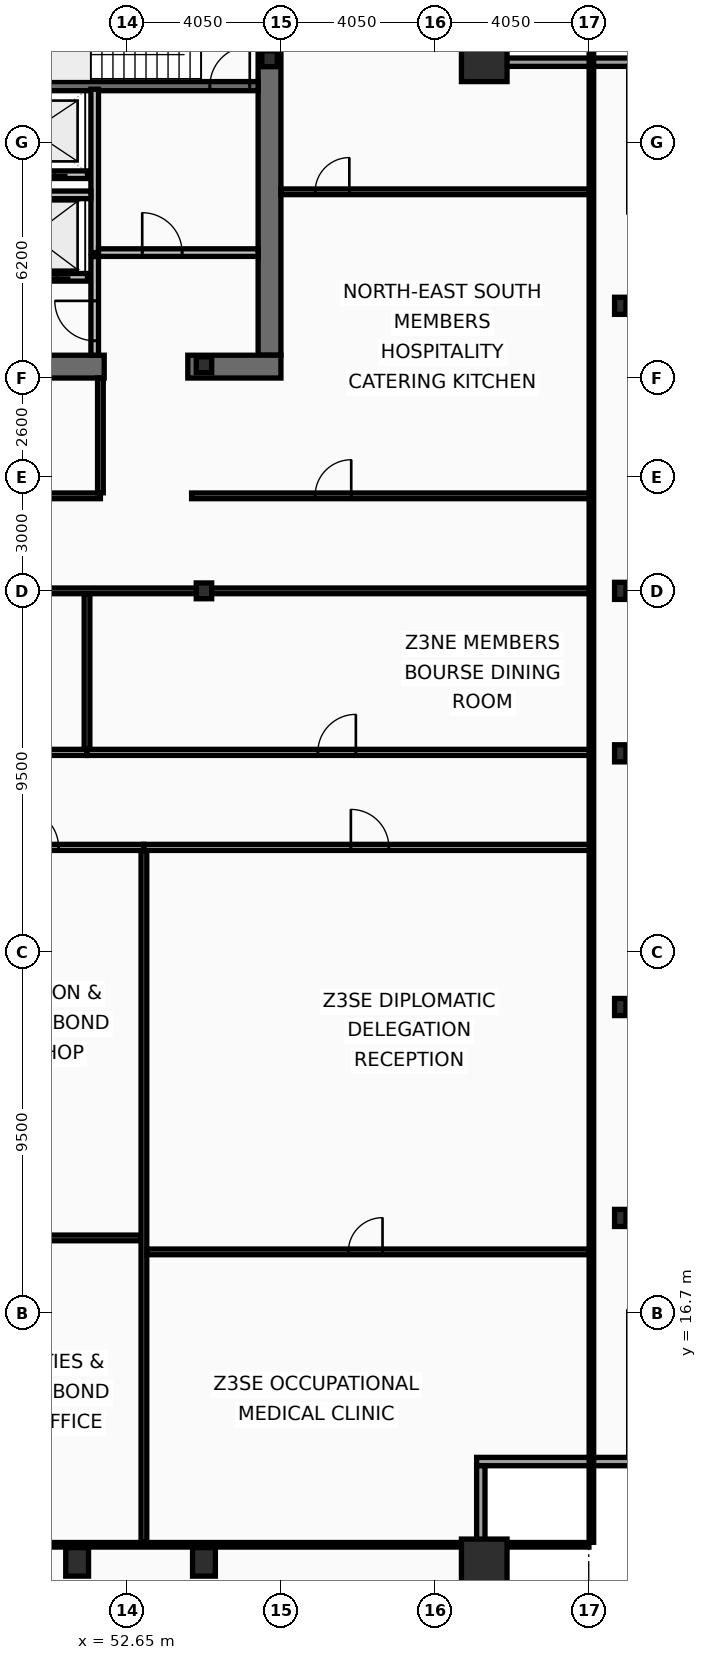
"""IFC4 building model, lengths in metres.
Left out: names, types, materials, properties, quantities, classifications, styles, units other than length and angle.
Written with IfcOpenShell. Run it as: python <this file> out.ifc"""

import sys

from ifc_helpers import new_model, si_unit, direction, frame, frame_2d, origin, origin_2d, place, context, subcontext, project, spatial, rectangle, hollow_rectangle, i_section, extrude, element, fill, save


model = new_model("IFC4")
c1 = context("Model", 3, precision=1e-05, world=origin(), true_north=direction((0.0, 1.0)))
c2 = subcontext(c1, "Body", "Model", "MODEL_VIEW")
j1 = project(units=[si_unit("LENGTHUNIT", "METRE"), si_unit("PLANEANGLEUNIT", "RADIAN")], contexts=[c1])
p1 = place(None, origin())
s1 = spatial("IfcSite", under=j1, at=p1, CompositionType="ELEMENT")
p2 = place(p1, origin())
s2 = spatial("IfcBuilding", under=s1, at=p2, CompositionType="ELEMENT")
p3 = place(p2, frame((0.0, 0.0, 213.8)))
s3 = spatial("IfcBuildingStorey", under=s2, at=p3, CompositionType="ELEMENT", Elevation=213.8)
p4 = place(p3, frame((56.4, 53.1, 0.0), z_axis=(0.0, 0.0, 1.0), x_axis=(0.0, -1.0, 0.0)))
e1 = element("IfcWall", 1, at=p4, inside=s3, PredefinedType="SHEAR", context=c2, shape_type="SweptSolid", body=[
    extrude(rectangle(XDim=11.2, YDim=0.6, at=frame_2d((5.6, 0.0))), origin(), (0.0, 0.0, 1.0), 3.44),
])
p5 = place(p3, frame((52.05, 41.6, 0.0), z_axis=(0.0, 0.0, 1.0), x_axis=(-1.0, 0.0, 0.0)))
e2 = element("IfcWall", 2, at=p5, inside=s3, PredefinedType="SHEAR", context=c2, shape_type="SweptSolid", body=[
    extrude(rectangle(XDim=11.3, YDim=0.6, at=frame_2d((5.65, 0.0))), origin(), (0.0, 0.0, 1.0), 3.44),
])
p6 = place(p3, frame((56.7, 41.6, 0.0), z_axis=(0.0, 0.0, 1.0), x_axis=(-1.0, 0.0, 0.0)))
e3 = element("IfcWall", 3, at=p6, inside=s3, PredefinedType="SHEAR", context=c2, shape_type="SweptSolid", body=[
    extrude(rectangle(XDim=2.45, YDim=0.6, at=frame_2d((1.225, 0.0))), origin(), (0.0, 0.0, 1.0), 3.44),
])
p7 = place(p3, frame((48.63, 48.98, 0.0), z_axis=(0.0, 0.0, 1.0), x_axis=(1.0, 0.0, 0.0)))
e4 = element("IfcWall", 4, at=p7, inside=s3, PredefinedType="SHEAR", context=c2, shape_type="SweptSolid", body=[
    extrude(rectangle(XDim=7.47, YDim=0.24, at=frame_2d((3.735, 0.0))), origin(), (0.0, 0.0, 1.0), 3.44),
])
p8 = place(p7, frame((6.2, 0.0, 0.0)))
e5 = element("IfcOpeningElement", 5, at=p8, cuts=e4, PredefinedType="OPENING", context=c2, shape_type="SweptSolid", body=[
    extrude(rectangle(XDim=1.05, YDim=2.15, at=frame_2d((0.525, 1.075))), frame((0.0, 0.13, 0.0), z_axis=(0.0, -1.0, 0.0), x_axis=(1.0, 0.0, 0.0)), (0.0, 0.0, 1.0), 0.26),
])
for number, where, z_axis, x_axis in (
    (6, (62.05, 10.15, 0.0), (0.0, 0.0, 1.0), (1.0, 0.0, 0.0)),
    (7, (62.05, 49.7, 0.0), (0.0, 0.0, 1.0), (1.0, 0.0, 0.0)),
):
    element("IfcColumn", number, at=place(p3, frame(where, z_axis=z_axis, x_axis=x_axis)), inside=s3, PredefinedType="COLUMN", context=c2, shape_type="SweptSolid", body=[
        extrude(hollow_rectangle(XDim=1.2, YDim=1.2, WallThickness=0.06, at=origin_2d()), origin(), (0.0, 0.0, 1.0), 3.6),
    ])
for number, where, z_axis, x_axis in (
    (8, (51.337, 10.15, 0.0), (0.0, 0.0, 1.0), (1.0, 0.0, 0.0)),
    (9, (54.675, 10.15, 0.0), (0.0, 0.0, 1.0), (1.0, 0.0, 0.0)),
):
    element("IfcColumn", number, at=place(p3, frame(where, z_axis=z_axis, x_axis=x_axis)), inside=s3, PredefinedType="COLUMN", context=c2, shape_type="SweptSolid", body=[
        extrude(hollow_rectangle(XDim=0.6, YDim=0.75, WallThickness=0.045, at=origin_2d()), origin(), (0.0, 0.0, 1.0), 3.6),
    ])
for number, where, z_axis, x_axis in (
    (10, (65.63, 19.2, 0.0), (0.0, 0.0, 1.0), (1.0, 0.0, 0.0)),
    (11, (65.63, 24.75, 0.0), (0.0, 0.0, 1.0), (1.0, 0.0, 0.0)),
    (12, (65.63, 31.425, 0.0), (0.0, 0.0, 1.0), (1.0, 0.0, 0.0)),
    (13, (65.63, 35.7, 0.0), (0.0, 0.0, 1.0), (1.0, 0.0, 0.0)),
    (14, (65.63, 43.2, 0.0), (0.0, 0.0, 1.0), (1.0, 0.0, 0.0)),
):
    element("IfcColumn", number, at=place(p3, frame(where, z_axis=z_axis, x_axis=x_axis)), inside=s3, PredefinedType="COLUMN", context=c2, shape_type="SweptSolid", body=[
        extrude(i_section(OverallWidth=0.3, OverallDepth=0.45, WebThickness=0.014, FlangeThickness=0.026, at=origin_2d()), origin(), (0.0, 0.0, 1.0), 3.6),
    ])
for number, where, z_axis, x_axis in (
    (15, (56.4, 49.7, 0.0), (0.0, 0.0, 1.0), (1.0, 0.0, 0.0)),
    (16, (54.675, 35.7, 0.0), (0.0, 0.0, 1.0), (1.0, 0.0, 0.0)),
    (17, (54.675, 41.65, 0.0), (0.0, 0.0, 1.0), (1.0, 0.0, 0.0)),
):
    element("IfcColumn", number, at=place(p3, frame(where, z_axis=z_axis, x_axis=x_axis)), inside=s3, PredefinedType="COLUMN", context=c2, shape_type="SweptSolid", body=[
        extrude(i_section(OverallWidth=0.406, OverallDepth=0.416, WebThickness=0.03, FlangeThickness=0.048, at=origin_2d()), origin(), (0.0, 0.0, 1.0), 3.6),
    ])
p9 = place(p3, frame((61.96, 53.63, 0.0), z_axis=(0.0, 0.0, 1.0), x_axis=(0.0, -1.0, 0.0)))
e18 = element("IfcWall", 18, at=p9, inside=s3, PredefinedType="SOLIDWALL", context=c2, shape_type="SweptSolid", body=[
    extrude(rectangle(XDim=3.91, YDim=0.22, at=frame_2d((1.955, 0.0))), origin(), (0.0, 0.0, 1.0), 2.83),
])
for number, where, z_axis, x_axis in (
    (19, (61.85, 49.61, 0.0), (0.0, 0.0, 1.0), (1.0, 0.0, 0.0)),
    (20, (66.07, 12.79, 0.0), (0.0, 0.0, 1.0), (-1.0, 0.0, 0.0)),
):
    element("IfcWall", number, at=place(p3, frame(where, z_axis=z_axis, x_axis=x_axis)), inside=s3, PredefinedType="SOLIDWALL", context=c2, shape_type="SweptSolid", body=[
        extrude(rectangle(XDim=4.22, YDim=0.22, at=frame_2d((2.11, 0.0))), origin(), (0.0, 0.0, 1.0), 2.83),
    ])
p10 = place(p3, frame((61.96, 12.68, 0.0), z_axis=(0.0, 0.0, 1.0), x_axis=(0.0, -1.0, 0.0)))
e21 = element("IfcWall", 21, at=p10, inside=s3, PredefinedType="SOLIDWALL", context=c2, shape_type="SweptSolid", body=[
    extrude(rectangle(XDim=3.91, YDim=0.22, at=frame_2d((1.955, 0.0))), origin(), (0.0, 0.0, 1.0), 2.83),
])
p11 = place(p3, frame((51.61, 43.95, 0.0), z_axis=(0.0, 0.0, 1.0), x_axis=(-1.0, 0.0, 0.0)))
e22 = element("IfcWall", 22, at=p11, inside=s3, PredefinedType="PARTITIONING", context=c2, shape_type="SweptSolid", body=[
    extrude(rectangle(XDim=2.92, YDim=0.2, at=frame_2d((1.46, 0.0))), origin(), (0.0, 0.0, 1.0), 3.44),
])
p12 = place(p11, frame((0.81, 0.0, 0.0)))
e23 = element("IfcOpeningElement", 23, at=p12, cuts=e22, PredefinedType="OPENING", context=c2, shape_type="SweptSolid", body=[
    extrude(rectangle(XDim=1.3, YDim=2.18, at=frame_2d((0.65, 1.09))), frame((0.0, 0.11, 0.0), z_axis=(0.0, -1.0, 0.0), x_axis=(1.0, 0.0, 0.0)), (0.0, 0.0, 1.0), 0.22),
])
p13 = place(p3, frame((51.61, 46.65, 0.0), z_axis=(0.0, 0.0, 1.0), x_axis=(-1.0, 0.0, 0.0)))
e24 = element("IfcWall", 24, at=p13, inside=s3, PredefinedType="PARTITIONING", context=c2, shape_type="SweptSolid", body=[
    extrude(rectangle(XDim=2.92, YDim=0.2, at=frame_2d((1.46, 0.0))), origin(), (0.0, 0.0, 1.0), 3.44),
])
p14 = place(p13, frame((0.86, 0.0, 0.0)))
e25 = element("IfcOpeningElement", 25, at=p14, cuts=e24, PredefinedType="OPENING", context=c2, shape_type="SweptSolid", body=[
    extrude(rectangle(XDim=1.2, YDim=2.18, at=frame_2d((0.6, 1.09))), frame((0.0, 0.11, 0.0), z_axis=(0.0, -1.0, 0.0), x_axis=(1.0, 0.0, 0.0)), (0.0, 0.0, 1.0), 0.22),
])
p15 = place(p3, frame((51.8, 44.6, 0.0), z_axis=(0.0, 0.0, 1.0), x_axis=(0.0, 1.0, 0.0)))
e26 = element("IfcWall", 26, at=p15, inside=s3, PredefinedType="PARTITIONING", context=c2, shape_type="SweptSolid", body=[
    extrude(rectangle(XDim=4.3, YDim=0.2, at=frame_2d((2.15, 0.0))), origin(), (0.0, 0.0, 1.0), 3.44),
])
p16 = place(p3, frame((51.9, 44.6, 0.0), z_axis=(0.0, 0.0, 1.0), x_axis=(1.0, 0.0, 0.0)))
e27 = element("IfcWall", 27, at=p16, inside=s3, PredefinedType="PARTITIONING", context=c2, shape_type="SweptSolid", body=[
    extrude(rectangle(XDim=4.2, YDim=0.2, at=frame_2d((2.1, 0.0))), origin(), (0.0, 0.0, 1.0), 3.44),
])
p17 = place(p16, frame((1.15, 0.0, 0.0)))
e28 = element("IfcOpeningElement", 28, at=p17, cuts=e27, PredefinedType="OPENING", context=c2, shape_type="SweptSolid", body=[
    extrude(rectangle(XDim=1.05, YDim=2.15, at=frame_2d((0.525, 1.075))), frame((0.0, 0.11, 0.0), z_axis=(0.0, -1.0, 0.0), x_axis=(1.0, 0.0, 0.0)), (0.0, 0.0, 1.0), 0.22),
])
p18 = place(p3, frame((48.63, 46.12, 0.0), z_axis=(0.0, 0.0, 1.0), x_axis=(1.0, 0.0, 0.0)))
e29 = element("IfcWall", 29, at=p18, inside=s3, PredefinedType="PARTITIONING", context=c2, shape_type="SweptSolid", body=[
    extrude(rectangle(XDim=3.07, YDim=0.2, at=frame_2d((1.535, 0.0))), origin(), (0.0, 0.0, 1.0), 3.44),
])
p19 = place(p3, frame((51.8, 41.9, 0.0), z_axis=(0.0, 0.0, 1.0), x_axis=(0.0, 1.0, 0.0)))
e30 = element("IfcWall", 30, at=p19, inside=s3, PredefinedType="PARTITIONING", context=c2, shape_type="SweptSolid", body=[
    extrude(rectangle(XDim=2.595, YDim=0.2, at=frame_2d((1.298, 0.0))), origin(), (0.0, 0.0, 1.0), 3.44),
])
p20 = place(p19, frame((0.38, 0.0, 0.0)))
e31 = element("IfcOpeningElement", 31, at=p20, cuts=e30, PredefinedType="OPENING", context=c2, shape_type="SweptSolid", body=[
    extrude(rectangle(XDim=1.05, YDim=2.15, at=frame_2d((0.525, 1.075))), frame((0.0, 0.11, 0.0), z_axis=(0.0, -1.0, 0.0), x_axis=(1.0, 0.0, 0.0)), (0.0, 0.0, 1.0), 0.22),
])
p21 = place(p3, frame((47.05, 38.2, 0.0), z_axis=(0.0, 0.0, 1.0), x_axis=(1.0, 0.0, 0.0)))
e32 = element("IfcWall", 32, at=p21, inside=s3, PredefinedType="PARTITIONING", context=c2, shape_type="SweptSolid", body=[
    extrude(rectangle(XDim=4.9, YDim=0.15, at=frame_2d((2.45, 0.0))), origin(), (0.0, 0.0, 1.0), 2.73),
])
p22 = place(p21, frame((1.1, 0.0, 0.0)))
e33 = element("IfcOpeningElement", 33, at=p22, cuts=e32, PredefinedType="OPENING", context=c2, shape_type="SweptSolid", body=[
    extrude(rectangle(XDim=1.0, YDim=2.05, at=frame_2d((0.5, 1.025))), frame((0.0, 0.085, 0.0), z_axis=(0.0, -1.0, 0.0), x_axis=(1.0, 0.0, 0.0)), (0.0, 0.0, 1.0), 0.17),
])
p23 = place(p3, frame((51.95, 38.28, 0.0), z_axis=(0.0, 0.0, 1.0), x_axis=(0.0, 1.0, 0.0)))
e34 = element("IfcWall", 34, at=p23, inside=s3, PredefinedType="PARTITIONING", context=c2, shape_type="SweptSolid", body=[
    extrude(rectangle(XDim=3.02, YDim=0.15, at=frame_2d((1.51, 0.0))), origin(), (0.0, 0.0, 1.0), 3.44),
])
p24 = place(p3, frame((54.35, 38.2, 0.0), z_axis=(0.0, 0.0, 1.0), x_axis=(1.0, 0.0, 0.0)))
e35 = element("IfcWall", 35, at=p24, inside=s3, PredefinedType="PARTITIONING", context=c2, shape_type="SweptSolid", body=[
    extrude(rectangle(XDim=10.52, YDim=0.15, at=frame_2d((5.26, 0.0))), origin(), (0.0, 0.0, 1.0), 2.73),
])
p25 = place(p24, frame((3.25, 0.0, 0.0)))
e36 = element("IfcOpeningElement", 36, at=p25, cuts=e35, PredefinedType="OPENING", context=c2, shape_type="SweptSolid", body=[
    extrude(rectangle(XDim=0.95, YDim=2.05, at=frame_2d((0.475, 1.025))), frame((0.0, 0.085, 0.0), z_axis=(0.0, -1.0, 0.0), x_axis=(1.0, 0.0, 0.0)), (0.0, 0.0, 1.0), 0.17),
])
p26 = place(p3, frame((56.7, 46.2, 0.0), z_axis=(0.0, 0.0, 1.0), x_axis=(1.0, 0.0, 0.0)))
e37 = element("IfcWall", 37, at=p26, inside=s3, PredefinedType="PARTITIONING", context=c2, shape_type="SweptSolid", body=[
    extrude(rectangle(XDim=8.105, YDim=0.15, at=frame_2d((4.052, 0.0))), origin(), (0.0, 0.0, 1.0), 2.83),
])
p27 = place(p26, frame((0.9, 0.0, 0.0)))
e38 = element("IfcOpeningElement", 38, at=p27, cuts=e37, PredefinedType="OPENING", context=c2, shape_type="SweptSolid", body=[
    extrude(rectangle(XDim=0.9, YDim=2.05, at=frame_2d((0.45, 1.025))), frame((0.0, 0.085, 0.0), z_axis=(0.0, -1.0, 0.0), x_axis=(1.0, 0.0, 0.0)), (0.0, 0.0, 1.0), 0.17),
])
p28 = place(p3, frame((39.88, 35.7, 0.0), z_axis=(0.0, 0.0, 1.0), x_axis=(1.0, 0.0, 0.0)))
e39 = element("IfcWall", 39, at=p28, inside=s3, PredefinedType="PARTITIONING", context=c2, shape_type="SweptSolid", body=[
    extrude(rectangle(XDim=24.925, YDim=0.15, at=frame_2d((12.462, 0.0))), origin(), (0.0, 0.0, 1.0), 2.73),
])
p29 = place(p3, frame((46.637, 28.95, 0.0), z_axis=(0.0, 0.0, 1.0), x_axis=(1.0, 0.0, 0.0)))
e40 = element("IfcWall", 40, at=p29, inside=s3, PredefinedType="PARTITIONING", context=c2, shape_type="SweptSolid", body=[
    extrude(rectangle(XDim=6.458, YDim=0.16, at=frame_2d((3.229, 0.0))), origin(), (0.0, 0.0, 1.0), 2.73),
])
p30 = place(p29, frame((3.212, 0.0, 0.0)))
e41 = element("IfcOpeningElement", 41, at=p30, cuts=e40, PredefinedType="OPENING", context=c2, shape_type="SweptSolid", body=[
    extrude(rectangle(XDim=1.0, YDim=2.05, at=frame_2d((0.5, 1.025))), frame((0.0, 0.09, 0.0), z_axis=(0.0, -1.0, 0.0), x_axis=(1.0, 0.0, 0.0)), (0.0, 0.0, 1.0), 0.18),
])
p31 = place(p3, frame((46.717, 18.674, 0.0), z_axis=(0.0, 0.0, 1.0), x_axis=(1.0, 0.0, 0.0)))
e42 = element("IfcWall", 42, at=p31, inside=s3, PredefinedType="PARTITIONING", context=c2, shape_type="SweptSolid", body=[
    extrude(rectangle(XDim=6.297, YDim=0.15, at=frame_2d((3.149, 0.0))), origin(), (0.0, 0.0, 1.0), 2.73),
])
p32 = place(p31, frame((2.906, 0.0, 0.0)))
e43 = element("IfcOpeningElement", 43, at=p32, cuts=e42, PredefinedType="OPENING", context=c2, shape_type="SweptSolid", body=[
    extrude(rectangle(XDim=0.9, YDim=2.05, at=frame_2d((0.45, 1.025))), frame((0.0, 0.085, 0.0), z_axis=(0.0, -1.0, 0.0), x_axis=(1.0, 0.0, 0.0)), (0.0, 0.0, 1.0), 0.17),
])
p33 = place(p3, frame((53.095, 28.95, 0.0), z_axis=(0.0, 0.0, 1.0), x_axis=(1.0, 0.0, 0.0)))
e44 = element("IfcWall", 44, at=p33, inside=s3, PredefinedType="PARTITIONING", context=c2, shape_type="SweptSolid", body=[
    extrude(rectangle(XDim=11.775, YDim=0.16, at=frame_2d((5.888, 0.0))), origin(), (0.0, 0.0, 1.0), 2.73),
])
p34 = place(p33, frame((5.446, 0.0, 0.0)))
e45 = element("IfcOpeningElement", 45, at=p34, cuts=e44, PredefinedType="OPENING", context=c2, shape_type="SweptSolid", body=[
    extrude(rectangle(XDim=1.0, YDim=2.05, at=frame_2d((0.5, 1.025))), frame((0.0, 0.09, 0.0), z_axis=(0.0, -1.0, 0.0), x_axis=(1.0, 0.0, 0.0)), (0.0, 0.0, 1.0), 0.18),
])
p35 = place(p3, frame((53.095, 10.665, 0.0), z_axis=(0.0, 0.0, 1.0), x_axis=(0.0, 1.0, 0.0)))
e46 = element("IfcWall", 46, at=p35, inside=s3, PredefinedType="PARTITIONING", context=c2, shape_type="SweptSolid", body=[
    extrude(rectangle(XDim=18.2, YDim=0.15, at=frame_2d((9.1, 0.0))), origin(), (0.0, 0.0, 1.0), 2.98),
])
p36 = place(p3, frame((53.175, 18.307, 0.0), z_axis=(0.0, 0.0, 1.0), x_axis=(1.0, 0.0, 0.0)))
e47 = element("IfcWall", 47, at=p36, inside=s3, PredefinedType="PARTITIONING", context=c2, shape_type="SweptSolid", body=[
    extrude(rectangle(XDim=11.63, YDim=0.15, at=frame_2d((5.815, 0.0))), origin(), (0.0, 0.0, 1.0), 2.73),
])
p37 = place(p36, frame((5.299, 0.0, 0.0)))
e48 = element("IfcOpeningElement", 48, at=p37, cuts=e47, PredefinedType="OPENING", context=c2, shape_type="SweptSolid", body=[
    extrude(rectangle(XDim=0.9, YDim=2.05, at=frame_2d((0.45, 1.025))), frame((0.0, 0.085, 0.0), z_axis=(0.0, -1.0, 0.0), x_axis=(1.0, 0.0, 0.0)), (0.0, 0.0, 1.0), 0.17),
])
p38 = place(p3, frame((39.8, 31.45, 0.0), z_axis=(0.0, 0.0, 1.0), x_axis=(1.0, 0.0, 0.0)))
e49 = element("IfcWall", 49, at=p38, inside=s3, PredefinedType="PARTITIONING", context=c2, shape_type="SweptSolid", body=[
    extrude(rectangle(XDim=11.798, YDim=0.16, at=frame_2d((5.899, 0.0))), origin(), (0.0, 0.0, 1.0), 2.73),
])
p39 = place(p38, frame((5.455, 0.0, 0.0)))
e50 = element("IfcOpeningElement", 50, at=p39, cuts=e49, PredefinedType="OPENING", context=c2, shape_type="SweptSolid", body=[
    extrude(rectangle(XDim=1.0, YDim=2.05, at=frame_2d((0.5, 1.025))), frame((0.0, 0.09, 0.0), z_axis=(0.0, -1.0, 0.0), x_axis=(1.0, 0.0, 0.0)), (0.0, 0.0, 1.0), 0.18),
])
p40 = place(p3, frame((51.598, 31.45, 0.0), z_axis=(0.0, 0.0, 1.0), x_axis=(1.0, 0.0, 0.0)))
e51 = element("IfcWall", 51, at=p40, inside=s3, PredefinedType="PARTITIONING", context=c2, shape_type="SweptSolid", body=[
    extrude(rectangle(XDim=13.272, YDim=0.16, at=frame_2d((6.636, 0.0))), origin(), (0.0, 0.0, 1.0), 2.73),
])
p41 = place(p40, frame((6.074, 0.0, 0.0)))
e52 = element("IfcOpeningElement", 52, at=p41, cuts=e51, PredefinedType="OPENING", context=c2, shape_type="SweptSolid", body=[
    extrude(rectangle(XDim=1.0, YDim=2.05, at=frame_2d((0.5, 1.025))), frame((0.0, 0.09, 0.0), z_axis=(0.0, -1.0, 0.0), x_axis=(1.0, 0.0, 0.0)), (0.0, 0.0, 1.0), 0.18),
])
p42 = place(p3, frame((51.598, 31.535, 0.0), z_axis=(0.0, 0.0, 1.0), x_axis=(0.0, 1.0, 0.0)))
e53 = element("IfcWall", 53, at=p42, inside=s3, PredefinedType="PARTITIONING", context=c2, shape_type="SweptSolid", body=[
    extrude(rectangle(XDim=4.085, YDim=0.15, at=frame_2d((2.042, 0.0))), origin(), (0.0, 0.0, 1.0), 2.98),
])
p43 = place(p3, frame((64.87, 10.665, 0.0), z_axis=(0.0, 0.0, 1.0), x_axis=(0.0, 1.0, 0.0)))
e54 = element("IfcWall", 54, at=p43, inside=s3, PredefinedType="PARTITIONING", context=c2, shape_type="SweptSolid", body=[
    extrude(rectangle(XDim=42.11, YDim=0.12, at=frame_2d((21.055, 0.0))), origin(), (0.0, 0.0, 1.0), 2.73),
])
p44 = place(p3, frame((8.095, 10.6, 0.0), z_axis=(0.0, 0.0, 1.0), x_axis=(1.0, 0.0, 0.0)))
e55 = element("IfcWall", 55, at=p44, inside=s3, PredefinedType="PARTITIONING", context=c2, shape_type="SweptSolid", body=[
    extrude(rectangle(XDim=56.71, YDim=0.12, at=frame_2d((28.355, 0.0))), origin(), (0.0, 0.0, 1.0), 2.73),
])
p45 = place(p8, origin())
e56 = element("IfcDoor", 56, at=p45, inside=s3, OperationType="SINGLE_SWING_RIGHT", PredefinedType="DOOR", context=c2, shape_type="SweptSolid", body=[
    extrude(rectangle(XDim=1.05, YDim=2.15, at=frame_2d((0.525, 1.075))), frame((0.0, 0.025, 0.0), z_axis=(0.0, -1.0, 0.0), x_axis=(1.0, 0.0, 0.0)), (0.0, 0.0, 1.0), 0.05),
])
fill(e5, e56)
p46 = place(p12, origin())
e57 = element("IfcDoor", 57, at=p46, inside=s3, OperationType="SLIDING_TO_LEFT", PredefinedType="DOOR", context=c2, shape_type="SweptSolid", body=[
    extrude(rectangle(XDim=1.3, YDim=2.18, at=frame_2d((0.65, 1.09))), frame((0.0, 0.025, 0.0), z_axis=(0.0, -1.0, 0.0), x_axis=(1.0, 0.0, 0.0)), (0.0, 0.0, 1.0), 0.05),
])
fill(e23, e57)
p47 = place(p14, origin())
e58 = element("IfcDoor", 58, at=p47, inside=s3, OperationType="SLIDING_TO_LEFT", PredefinedType="DOOR", context=c2, shape_type="SweptSolid", body=[
    extrude(rectangle(XDim=1.2, YDim=2.18, at=frame_2d((0.6, 1.09))), frame((0.0, 0.025, 0.0), z_axis=(0.0, -1.0, 0.0), x_axis=(1.0, 0.0, 0.0)), (0.0, 0.0, 1.0), 0.05),
])
fill(e25, e58)
p48 = place(p17, origin())
e59 = element("IfcDoor", 59, at=p48, inside=s3, OperationType="SINGLE_SWING_LEFT", PredefinedType="DOOR", context=c2, shape_type="SweptSolid", body=[
    extrude(rectangle(XDim=1.05, YDim=2.15, at=frame_2d((0.525, 1.075))), frame((0.0, 0.025, 0.0), z_axis=(0.0, -1.0, 0.0), x_axis=(1.0, 0.0, 0.0)), (0.0, 0.0, 1.0), 0.05),
])
fill(e28, e59)
p49 = place(p20, origin())
e60 = element("IfcDoor", 60, at=p49, inside=s3, OperationType="SINGLE_SWING_RIGHT", PredefinedType="DOOR", context=c2, shape_type="SweptSolid", body=[
    extrude(rectangle(XDim=1.05, YDim=2.15, at=frame_2d((0.525, 1.075))), frame((0.0, 0.025, 0.0), z_axis=(0.0, -1.0, 0.0), x_axis=(1.0, 0.0, 0.0)), (0.0, 0.0, 1.0), 0.05),
])
fill(e31, e60)
p50 = place(p25, origin())
e61 = element("IfcDoor", 61, at=p50, inside=s3, OperationType="SINGLE_SWING_RIGHT", PredefinedType="DOOR", context=c2, shape_type="SweptSolid", body=[
    extrude(rectangle(XDim=0.95, YDim=2.05, at=frame_2d((0.475, 1.025))), frame((0.0, 0.025, 0.0), z_axis=(0.0, -1.0, 0.0), x_axis=(1.0, 0.0, 0.0)), (0.0, 0.0, 1.0), 0.05),
])
fill(e36, e61)
p51 = place(p27, origin())
e62 = element("IfcDoor", 62, at=p51, inside=s3, OperationType="SINGLE_SWING_RIGHT", PredefinedType="DOOR", context=c2, shape_type="SweptSolid", body=[
    extrude(rectangle(XDim=0.9, YDim=2.05, at=frame_2d((0.45, 1.025))), frame((0.0, 0.025, 0.0), z_axis=(0.0, -1.0, 0.0), x_axis=(1.0, 0.0, 0.0)), (0.0, 0.0, 1.0), 0.05),
])
fill(e38, e62)
p52 = place(p30, origin())
e63 = element("IfcDoor", 63, at=p52, inside=s3, OperationType="SINGLE_SWING_LEFT", PredefinedType="DOOR", context=c2, shape_type="SweptSolid", body=[
    extrude(rectangle(XDim=1.0, YDim=2.05, at=frame_2d((0.5, 1.025))), frame((0.0, 0.025, 0.0), z_axis=(0.0, -1.0, 0.0), x_axis=(1.0, 0.0, 0.0)), (0.0, 0.0, 1.0), 0.05),
])
fill(e41, e63)
p53 = place(p34, origin())
e64 = element("IfcDoor", 64, at=p53, inside=s3, OperationType="SINGLE_SWING_LEFT", PredefinedType="DOOR", context=c2, shape_type="SweptSolid", body=[
    extrude(rectangle(XDim=1.0, YDim=2.05, at=frame_2d((0.5, 1.025))), frame((0.0, 0.025, 0.0), z_axis=(0.0, -1.0, 0.0), x_axis=(1.0, 0.0, 0.0)), (0.0, 0.0, 1.0), 0.05),
])
fill(e45, e64)
p54 = place(p37, origin())
e65 = element("IfcDoor", 65, at=p54, inside=s3, OperationType="SINGLE_SWING_RIGHT", PredefinedType="DOOR", context=c2, shape_type="SweptSolid", body=[
    extrude(rectangle(XDim=0.9, YDim=2.05, at=frame_2d((0.45, 1.025))), frame((0.0, 0.025, 0.0), z_axis=(0.0, -1.0, 0.0), x_axis=(1.0, 0.0, 0.0)), (0.0, 0.0, 1.0), 0.05),
])
fill(e48, e65)
p55 = place(p41, origin())
e66 = element("IfcDoor", 66, at=p55, inside=s3, OperationType="SINGLE_SWING_RIGHT", PredefinedType="DOOR", context=c2, shape_type="SweptSolid", body=[
    extrude(rectangle(XDim=1.0, YDim=2.05, at=frame_2d((0.5, 1.025))), frame((0.0, 0.025, 0.0), z_axis=(0.0, -1.0, 0.0), x_axis=(1.0, 0.0, 0.0)), (0.0, 0.0, 1.0), 0.05),
])
fill(e52, e66)
save(model, sys.argv[1])
